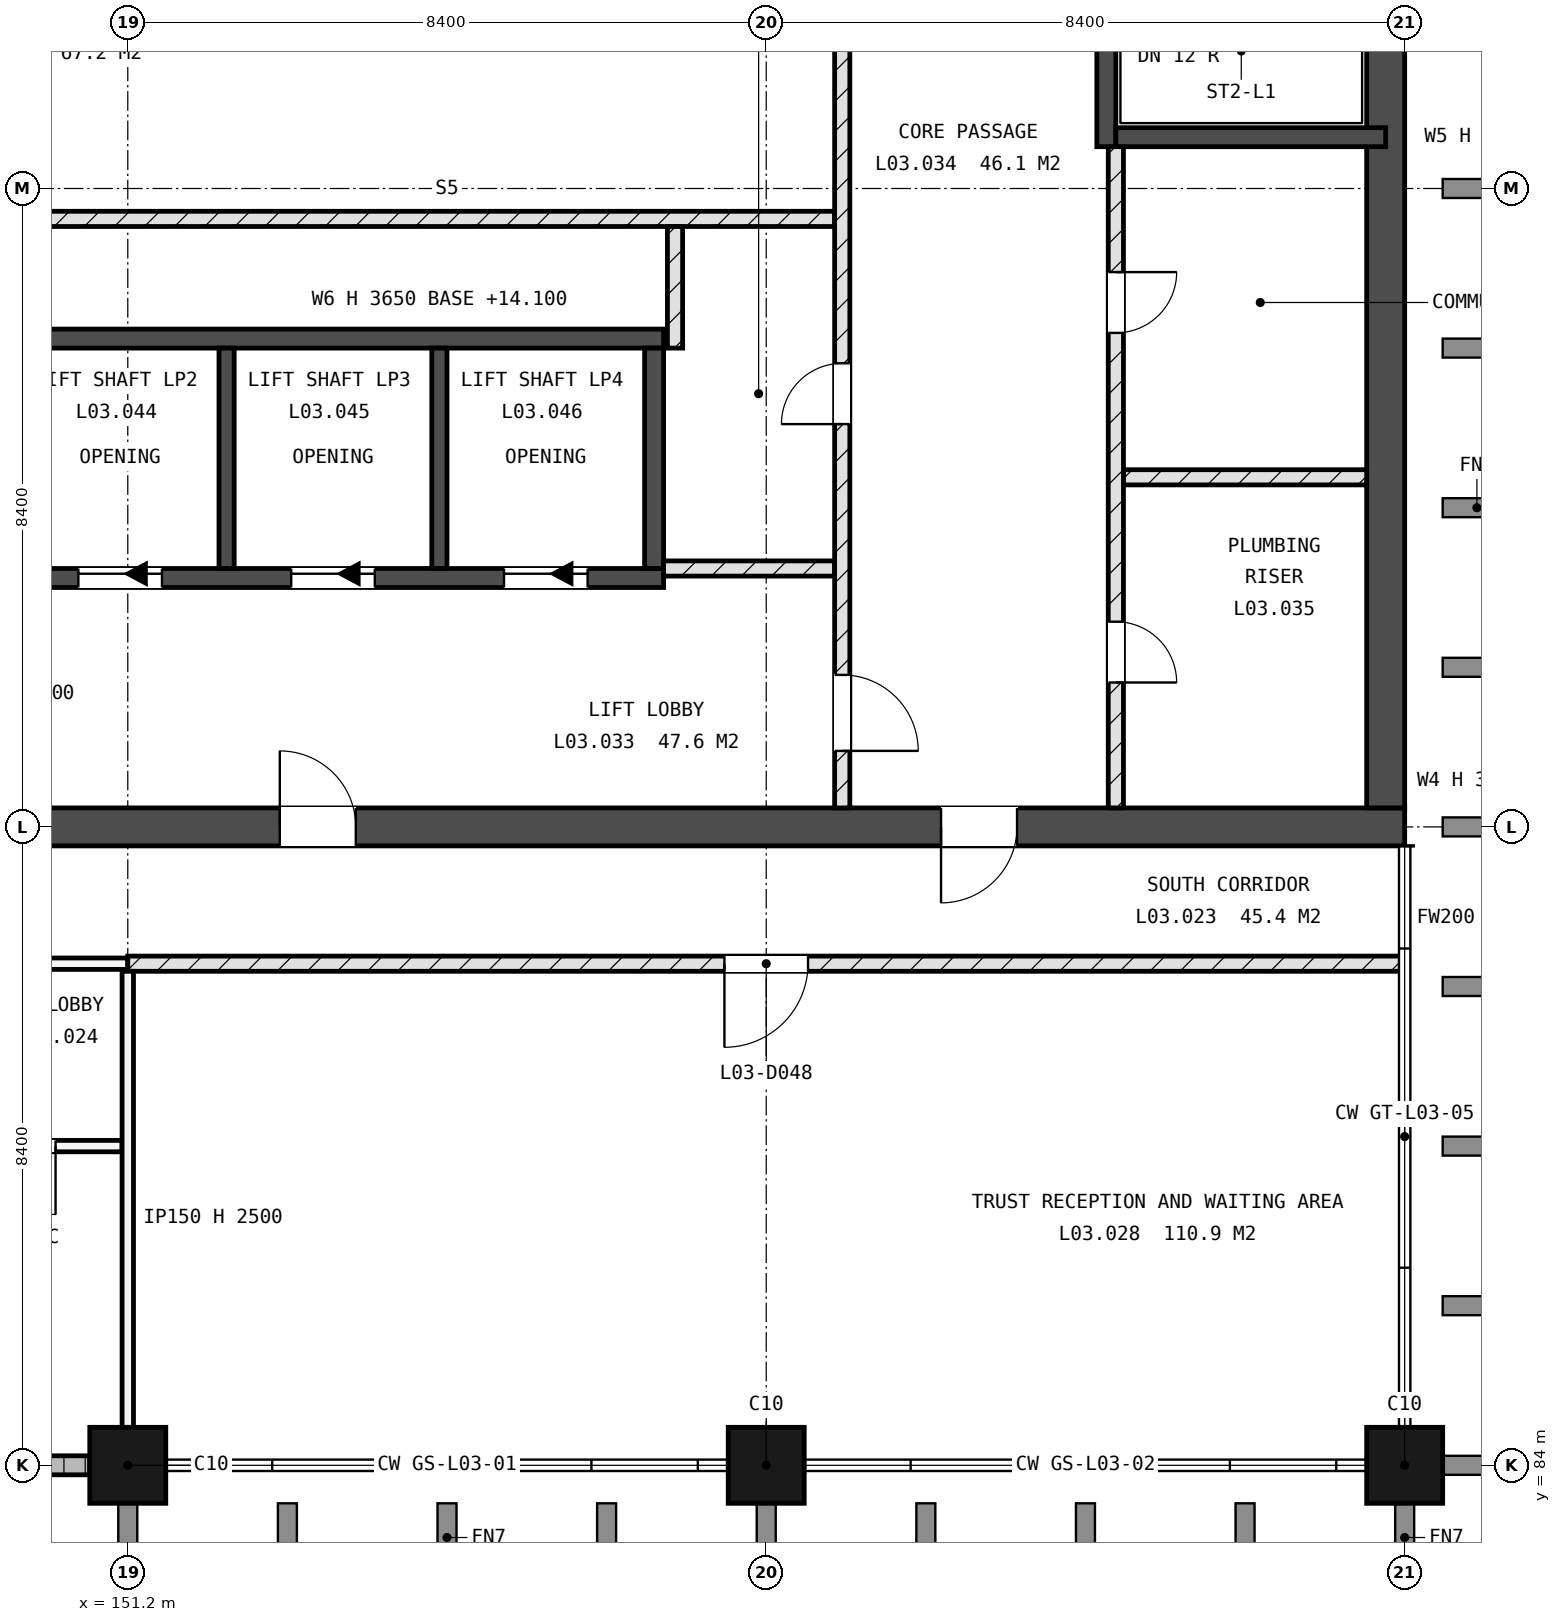
"""IFC4 building model, lengths in metres.
Left out: names, types, materials, properties, quantities, classifications, styles, units other than length and angle.
Written with IfcOpenShell. Run it as: python <this file> out.ifc"""

import sys

from ifc_helpers import new_model, si_unit, direction, frame, frame_2d, origin, origin_2d, place, context, subcontext, project, spatial, rectangle, extrude, element, fill, save


model = new_model("IFC4")
c1 = context("Model", 3, precision=1e-05, world=origin(), true_north=direction((0.0, 1.0)))
c2 = subcontext(c1, "Body", "Model", "MODEL_VIEW")
j1 = project(units=[si_unit("LENGTHUNIT", "METRE"), si_unit("PLANEANGLEUNIT", "RADIAN")], contexts=[c1])
p1 = place(None, origin())
s1 = spatial("IfcSite", under=j1, at=p1, CompositionType="ELEMENT")
p2 = place(p1, origin())
s2 = spatial("IfcBuilding", under=s1, at=p2, CompositionType="ELEMENT")
p3 = place(p2, frame((0.0, 0.0, 14.4)))
s3 = spatial("IfcBuildingStorey", under=s2, at=p3, CompositionType="ELEMENT", Elevation=14.4)
for number, where, z_axis, x_axis in (
    (1, (151.2, 84.0, -0.3), (0.0, 0.0, 1.0), (1.0, 0.0, 0.0)),
    (2, (159.6, 84.0, -0.3), (0.0, 0.0, 1.0), (1.0, 0.0, 0.0)),
    (3, (168.0, 84.0, -0.3), (0.0, 0.0, 1.0), (1.0, 0.0, 0.0)),
):
    element("IfcColumn", number, at=place(p3, frame(where, z_axis=z_axis, x_axis=x_axis)), inside=s3, PredefinedType="COLUMN", context=c2, shape_type="SweptSolid", body=[
        extrude(rectangle(XDim=1.0, YDim=1.0, at=origin_2d()), origin(), (0.0, 0.0, 1.0), 3.65),
    ])
p4 = place(p3, frame((142.8, 92.4, -0.3), z_axis=(0.0, 0.0, 1.0), x_axis=(1.0, 0.0, 0.0)))
e4 = element("IfcWall", 4, at=p4, inside=s3, PredefinedType="SHEAR", context=c2, shape_type="SweptSolid", body=[
    extrude(rectangle(XDim=25.2, YDim=0.5, at=frame_2d((12.6, 0.0))), origin(), (0.0, 0.0, 1.0), 3.65),
])
p5 = place(p4, frame((1.4, 0.0, 0.3)))
e5 = element("IfcOpeningElement", 5, at=p5, cuts=e4, PredefinedType="OPENING", context=c2, shape_type="SweptSolid", body=[
    extrude(rectangle(XDim=1.0, YDim=2.1, at=frame_2d((0.5, 1.05))), frame((0.0, 0.26, 0.0), z_axis=(0.0, -1.0, 0.0), x_axis=(1.0, 0.0, 0.0)), (0.0, 0.0, 1.0), 0.52),
])
p6 = place(p4, frame((19.1, 0.0, 0.3)))
e6 = element("IfcOpeningElement", 6, at=p6, cuts=e4, PredefinedType="OPENING", context=c2, shape_type="SweptSolid", body=[
    extrude(rectangle(XDim=1.0, YDim=2.1, at=frame_2d((0.5, 1.05))), frame((0.0, 0.26, 0.0), z_axis=(0.0, -1.0, 0.0), x_axis=(1.0, 0.0, 0.0)), (0.0, 0.0, 1.0), 0.52),
])
p7 = place(p4, frame((10.4, 0.0, 0.3)))
e7 = element("IfcOpeningElement", 7, at=p7, cuts=e4, PredefinedType="OPENING", context=c2, shape_type="SweptSolid", body=[
    extrude(rectangle(XDim=1.0, YDim=2.1, at=frame_2d((0.5, 1.05))), frame((0.0, 0.26, 0.0), z_axis=(0.0, -1.0, 0.0), x_axis=(1.0, 0.0, 0.0)), (0.0, 0.0, 1.0), 0.52),
])
p8 = place(p3, frame((167.75, 92.65, -0.3), z_axis=(0.0, 0.0, 1.0), x_axis=(0.0, 1.0, 0.0)))
e8 = element("IfcWall", 8, at=p8, inside=s3, PredefinedType="SHEAR", context=c2, shape_type="SweptSolid", body=[
    extrude(rectangle(XDim=16.3, YDim=0.5, at=frame_2d((8.15, 0.0))), origin(), (0.0, 0.0, 1.0), 3.65),
])
p9 = place(p8, frame((12.15, 0.0, 1.9)))
e9 = element("IfcOpeningElement", 9, at=p9, cuts=e8, PredefinedType="OPENING", context=c2, shape_type="SweptSolid", body=[
    extrude(rectangle(XDim=1.2, YDim=0.9, at=frame_2d((0.6, 0.45))), frame((0.0, 0.26, 0.0), z_axis=(0.0, -1.0, 0.0), x_axis=(1.0, 0.0, 0.0)), (0.0, 0.0, 1.0), 0.52),
])
p10 = place(p3, frame((164.075, 101.35, -0.3), z_axis=(0.0, 0.0, 1.0), x_axis=(0.0, 1.0, 0.0)))
e10 = element("IfcWall", 10, at=p10, inside=s3, PredefinedType="SHEAR", context=c2, shape_type="SweptSolid", body=[
    extrude(rectangle(XDim=7.6, YDim=0.25, at=frame_2d((3.8, 0.0))), origin(), (0.0, 0.0, 1.0), 3.65),
])
p11 = place(p10, frame((6.5, 0.0, 0.3)))
e11 = element("IfcOpeningElement", 11, at=p11, cuts=e10, PredefinedType="OPENING", context=c2, shape_type="SweptSolid", body=[
    extrude(rectangle(XDim=1.0, YDim=2.1, at=frame_2d((0.5, 1.05))), frame((0.0, 0.135, 0.0), z_axis=(0.0, -1.0, 0.0), x_axis=(1.0, 0.0, 0.0)), (0.0, 0.0, 1.0), 0.27),
])
p12 = place(p3, frame((164.2, 101.475, -0.3), z_axis=(0.0, 0.0, 1.0), x_axis=(1.0, 0.0, 0.0)))
e12 = element("IfcWall", 12, at=p12, inside=s3, PredefinedType="SHEAR", context=c2, shape_type="SweptSolid", body=[
    extrude(rectangle(XDim=3.55, YDim=0.25, at=frame_2d((1.775, 0.0))), origin(), (0.0, 0.0, 1.0), 3.65),
])
p13 = place(p3, frame((147.0, 95.675, -0.3), z_axis=(0.0, 0.0, 1.0), x_axis=(1.0, 0.0, 0.0)))
e13 = element("IfcWall", 13, at=p13, inside=s3, PredefinedType="SHEAR", context=c2, shape_type="SweptSolid", body=[
    extrude(rectangle(XDim=11.25, YDim=0.25, at=frame_2d((5.625, 0.0))), origin(), (0.0, 0.0, 1.0), 3.65),
])
p14 = place(p13, frame((0.75, 0.0, 0.3)))
e14 = element("IfcOpeningElement", 14, at=p14, cuts=e13, PredefinedType="OPENING", context=c2, shape_type="SweptSolid", body=[
    extrude(rectangle(XDim=1.1, YDim=2.1, at=frame_2d((0.55, 1.05))), frame((0.0, 0.135, 0.0), z_axis=(0.0, -1.0, 0.0), x_axis=(1.0, 0.0, 0.0)), (0.0, 0.0, 1.0), 0.27),
])
p15 = place(p13, frame((3.55, 0.0, 0.3)))
e15 = element("IfcOpeningElement", 15, at=p15, cuts=e13, PredefinedType="OPENING", context=c2, shape_type="SweptSolid", body=[
    extrude(rectangle(XDim=1.1, YDim=2.1, at=frame_2d((0.55, 1.05))), frame((0.0, 0.135, 0.0), z_axis=(0.0, -1.0, 0.0), x_axis=(1.0, 0.0, 0.0)), (0.0, 0.0, 1.0), 0.27),
])
p16 = place(p13, frame((6.35, 0.0, 0.3)))
e16 = element("IfcOpeningElement", 16, at=p16, cuts=e13, PredefinedType="OPENING", context=c2, shape_type="SweptSolid", body=[
    extrude(rectangle(XDim=1.1, YDim=2.1, at=frame_2d((0.55, 1.05))), frame((0.0, 0.135, 0.0), z_axis=(0.0, -1.0, 0.0), x_axis=(1.0, 0.0, 0.0)), (0.0, 0.0, 1.0), 0.27),
])
p17 = place(p13, frame((9.15, 0.0, 0.3)))
e17 = element("IfcOpeningElement", 17, at=p17, cuts=e13, PredefinedType="OPENING", context=c2, shape_type="SweptSolid", body=[
    extrude(rectangle(XDim=1.1, YDim=2.1, at=frame_2d((0.55, 1.05))), frame((0.0, 0.135, 0.0), z_axis=(0.0, -1.0, 0.0), x_axis=(1.0, 0.0, 0.0)), (0.0, 0.0, 1.0), 0.27),
])
p18 = place(p3, frame((147.0, 98.825, -0.3), z_axis=(0.0, 0.0, 1.0), x_axis=(1.0, 0.0, 0.0)))
e18 = element("IfcWall", 18, at=p18, inside=s3, PredefinedType="SHEAR", context=c2, shape_type="SweptSolid", body=[
    extrude(rectangle(XDim=11.25, YDim=0.25, at=frame_2d((5.625, 0.0))), origin(), (0.0, 0.0, 1.0), 3.65),
])
p19 = place(p3, frame((158.125, 95.8, -0.3), z_axis=(0.0, 0.0, 1.0), x_axis=(0.0, 1.0, 0.0)))
e19 = element("IfcWall", 19, at=p19, inside=s3, PredefinedType="SHEAR", context=c2, shape_type="SweptSolid", body=[
    extrude(rectangle(XDim=2.9, YDim=0.25, at=frame_2d((1.45, 0.0))), origin(), (0.0, 0.0, 1.0), 3.65),
])
for number, where, z_axis, x_axis in (
    (20, (152.5, 95.8, -0.3), (0.0, 0.0, 1.0), (0.0, 1.0, 0.0)),
    (21, (155.3, 95.8, -0.3), (0.0, 0.0, 1.0), (0.0, 1.0, 0.0)),
):
    element("IfcWall", number, at=place(p3, frame(where, z_axis=z_axis, x_axis=x_axis)), inside=s3, PredefinedType="SHEAR", context=c2, shape_type="SweptSolid", body=[
        extrude(rectangle(XDim=2.9, YDim=0.2, at=frame_2d((1.45, 0.0))), origin(), (0.0, 0.0, 1.0), 3.65),
    ])
p20 = place(p3, frame((143.3, 84.0, 0.0), z_axis=(0.0, 0.0, 1.0), x_axis=(1.0, 0.0, 0.0)))
e22 = element("IfcWall", 22, at=p20, inside=s3, PredefinedType="STANDARD", context=c2, shape_type="SweptSolid", body=[
    extrude(rectangle(XDim=7.4, YDim=0.25, at=frame_2d((3.7, 0.0))), origin(), (0.0, 0.0, 1.0), 2.65),
])
p21 = place(p3, frame((142.925, 88.2, 0.0), z_axis=(0.0, 0.0, 1.0), x_axis=(1.0, 0.0, 0.0)))
e23 = element("IfcWall", 23, at=p21, inside=s3, PredefinedType="PARTITIONING", context=c2, shape_type="SweptSolid", body=[
    extrude(rectangle(XDim=8.2, YDim=0.15, at=frame_2d((4.1, 0.0))), origin(), (0.0, 0.0, 1.0), 3.3),
])
p22 = place(p21, frame((0.825, 0.0, 0.0)))
e24 = element("IfcOpeningElement", 24, at=p22, cuts=e23, PredefinedType="OPENING", context=c2, shape_type="SweptSolid", body=[
    extrude(rectangle(XDim=0.9, YDim=2.1, at=frame_2d((0.45, 1.05))), frame((0.0, 0.085, 0.0), z_axis=(0.0, -1.0, 0.0), x_axis=(1.0, 0.0, 0.0)), (0.0, 0.0, 1.0), 0.17),
])
p23 = place(p21, frame((3.55, 0.0, 0.0)))
e25 = element("IfcOpeningElement", 25, at=p23, cuts=e23, PredefinedType="OPENING", context=c2, shape_type="SweptSolid", body=[
    extrude(rectangle(XDim=1.05, YDim=2.25, at=frame_2d((0.525, 1.125))), frame((0.0, 0.085, 0.0), z_axis=(0.0, -1.0, 0.0), x_axis=(1.0, 0.0, 0.0)), (0.0, 0.0, 1.0), 0.17),
])
p24 = place(p21, frame((6.425, 0.0, 0.0)))
e26 = element("IfcOpeningElement", 26, at=p24, cuts=e23, PredefinedType="OPENING", context=c2, shape_type="SweptSolid", body=[
    extrude(rectangle(XDim=0.9, YDim=2.1, at=frame_2d((0.45, 1.05))), frame((0.0, 0.085, 0.0), z_axis=(0.0, -1.0, 0.0), x_axis=(1.0, 0.0, 0.0)), (0.0, 0.0, 1.0), 0.17),
])
p25 = place(p3, frame((142.925, 90.6, 0.0), z_axis=(0.0, 0.0, 1.0), x_axis=(1.0, 0.0, 0.0)))
e27 = element("IfcWall", 27, at=p25, inside=s3, PredefinedType="PARTITIONING", context=c2, shape_type="SweptSolid", body=[
    extrude(rectangle(XDim=8.275, YDim=0.15, at=frame_2d((4.137, 0.0))), origin(), (0.0, 0.0, 1.0), 3.3),
])
p26 = place(p25, frame((3.575, 0.0, 0.0)))
e28 = element("IfcOpeningElement", 28, at=p26, cuts=e27, PredefinedType="OPENING", context=c2, shape_type="SweptSolid", body=[
    extrude(rectangle(XDim=1.0, YDim=2.1, at=frame_2d((0.5, 1.05))), frame((0.0, 0.085, 0.0), z_axis=(0.0, -1.0, 0.0), x_axis=(1.0, 0.0, 0.0)), (0.0, 0.0, 1.0), 0.17),
])
p27 = place(p3, frame((151.2, 90.6, 0.0), z_axis=(0.0, 0.0, 1.0), x_axis=(1.0, 0.0, 0.0)))
e29 = element("IfcWall", 29, at=p27, inside=s3, PredefinedType="SOLIDWALL", context=c2, shape_type="SweptSolid", body=[
    extrude(rectangle(XDim=16.8, YDim=0.2, at=frame_2d((8.4, 0.0))), origin(), (0.0, 0.0, 1.0), 3.3),
])
p28 = place(p27, frame((7.85, 0.0, 0.0)))
e30 = element("IfcOpeningElement", 30, at=p28, cuts=e29, PredefinedType="OPENING", context=c2, shape_type="SweptSolid", body=[
    extrude(rectangle(XDim=1.1, YDim=2.25, at=frame_2d((0.55, 1.125))), frame((0.0, 0.11, 0.0), z_axis=(0.0, -1.0, 0.0), x_axis=(1.0, 0.0, 0.0)), (0.0, 0.0, 1.0), 0.22),
])
p29 = place(p3, frame((158.25, 95.8, 0.0), z_axis=(0.0, 0.0, 1.0), x_axis=(1.0, 0.0, 0.0)))
e31 = element("IfcWall", 31, at=p29, inside=s3, PredefinedType="SOLIDWALL", context=c2, shape_type="SweptSolid", body=[
    extrude(rectangle(XDim=2.25, YDim=0.2, at=frame_2d((1.125, 0.0))), origin(), (0.0, 0.0, 1.0), 3.3),
])
p30 = place(p3, frame((164.3, 97.0, 0.0), z_axis=(0.0, 0.0, 1.0), x_axis=(1.0, 0.0, 0.0)))
e32 = element("IfcWall", 32, at=p30, inside=s3, PredefinedType="SOLIDWALL", context=c2, shape_type="SweptSolid", body=[
    extrude(rectangle(XDim=3.2, YDim=0.2, at=frame_2d((1.6, 0.0))), origin(), (0.0, 0.0, 1.0), 3.3),
])
p31 = place(p3, frame((146.5, 100.4, 0.0), z_axis=(0.0, 0.0, 1.0), x_axis=(1.0, 0.0, 0.0)))
e33 = element("IfcWall", 33, at=p31, inside=s3, PredefinedType="SOLIDWALL", context=c2, shape_type="SweptSolid", body=[
    extrude(rectangle(XDim=14.0, YDim=0.2, at=frame_2d((7.0, 0.0))), origin(), (0.0, 0.0, 1.0), 3.3),
])
p32 = place(p3, frame((151.2, 84.0, 0.0), z_axis=(0.0, 0.0, 1.0), x_axis=(0.0, 1.0, 0.0)))
e34 = element("IfcWall", 34, at=p32, inside=s3, PredefinedType="PARTITIONING", context=c2, shape_type="SweptSolid", body=[
    extrude(rectangle(XDim=6.5, YDim=0.15, at=frame_2d((3.25, 0.0))), origin(), (0.0, 0.0, 1.0), 2.5),
])
p33 = place(p3, frame((158.4, 98.7, 0.0), z_axis=(0.0, 0.0, 1.0), x_axis=(0.0, 1.0, 0.0)))
e35 = element("IfcWall", 35, at=p33, inside=s3, PredefinedType="SOLIDWALL", context=c2, shape_type="SweptSolid", body=[
    extrude(rectangle(XDim=1.6, YDim=0.2, at=frame_2d((0.8, 0.0))), origin(), (0.0, 0.0, 1.0), 3.3),
])
p34 = place(p3, frame((160.6, 92.65, 0.0), z_axis=(0.0, 0.0, 1.0), x_axis=(0.0, 1.0, 0.0)))
e36 = element("IfcWall", 36, at=p34, inside=s3, PredefinedType="SOLIDWALL", context=c2, shape_type="SweptSolid", body=[
    extrude(rectangle(XDim=12.45, YDim=0.2, at=frame_2d((6.225, 0.0))), origin(), (0.0, 0.0, 1.0), 3.3),
])
p35 = place(p34, frame((5.05, 0.0, 0.0)))
e37 = element("IfcOpeningElement", 37, at=p35, cuts=e36, PredefinedType="OPENING", context=c2, shape_type="SweptSolid", body=[
    extrude(rectangle(XDim=0.8, YDim=2.1, at=frame_2d((0.4, 1.05))), frame((0.0, 0.11, 0.0), z_axis=(0.0, -1.0, 0.0), x_axis=(1.0, 0.0, 0.0)), (0.0, 0.0, 1.0), 0.22),
])
p36 = place(p34, frame((0.75, 0.0, 0.0)))
e38 = element("IfcOpeningElement", 38, at=p36, cuts=e36, PredefinedType="OPENING", context=c2, shape_type="SweptSolid", body=[
    extrude(rectangle(XDim=1.0, YDim=2.1, at=frame_2d((0.5, 1.05))), frame((0.0, 0.11, 0.0), z_axis=(0.0, -1.0, 0.0), x_axis=(1.0, 0.0, 0.0)), (0.0, 0.0, 1.0), 0.22),
])
p37 = place(p3, frame((164.2, 92.65, 0.0), z_axis=(0.0, 0.0, 1.0), x_axis=(0.0, 1.0, 0.0)))
e39 = element("IfcWall", 39, at=p37, inside=s3, PredefinedType="SOLIDWALL", context=c2, shape_type="SweptSolid", body=[
    extrude(rectangle(XDim=8.7, YDim=0.2, at=frame_2d((4.35, 0.0))), origin(), (0.0, 0.0, 1.0), 3.3),
])
p38 = place(p37, frame((1.65, 0.0, 0.0)))
e40 = element("IfcOpeningElement", 40, at=p38, cuts=e39, PredefinedType="OPENING", context=c2, shape_type="SweptSolid", body=[
    extrude(rectangle(XDim=0.8, YDim=2.1, at=frame_2d((0.4, 1.05))), frame((0.0, 0.11, 0.0), z_axis=(0.0, -1.0, 0.0), x_axis=(1.0, 0.0, 0.0)), (0.0, 0.0, 1.0), 0.22),
])
p39 = place(p37, frame((6.25, 0.0, 0.0)))
e41 = element("IfcOpeningElement", 41, at=p39, cuts=e39, PredefinedType="OPENING", context=c2, shape_type="SweptSolid", body=[
    extrude(rectangle(XDim=0.8, YDim=2.1, at=frame_2d((0.4, 1.05))), frame((0.0, 0.11, 0.0), z_axis=(0.0, -1.0, 0.0), x_axis=(1.0, 0.0, 0.0)), (0.0, 0.0, 1.0), 0.22),
])
p40 = place(p15, origin())
e42 = element("IfcDoor", 42, at=p40, inside=s3, OperationType="SLIDING_TO_LEFT", PredefinedType="DOOR", context=c2, shape_type="SweptSolid", body=[
    extrude(rectangle(XDim=1.1, YDim=2.1, at=frame_2d((0.55, 1.05))), frame((0.0, 0.025, 0.0), z_axis=(0.0, -1.0, 0.0), x_axis=(1.0, 0.0, 0.0)), (0.0, 0.0, 1.0), 0.05),
])
fill(e15, e42)
p41 = place(p16, origin())
e43 = element("IfcDoor", 43, at=p41, inside=s3, OperationType="SLIDING_TO_LEFT", PredefinedType="DOOR", context=c2, shape_type="SweptSolid", body=[
    extrude(rectangle(XDim=1.1, YDim=2.1, at=frame_2d((0.55, 1.05))), frame((0.0, 0.025, 0.0), z_axis=(0.0, -1.0, 0.0), x_axis=(1.0, 0.0, 0.0)), (0.0, 0.0, 1.0), 0.05),
])
fill(e16, e43)
p42 = place(p17, origin())
e44 = element("IfcDoor", 44, at=p42, inside=s3, OperationType="SLIDING_TO_LEFT", PredefinedType="DOOR", context=c2, shape_type="SweptSolid", body=[
    extrude(rectangle(XDim=1.1, YDim=2.1, at=frame_2d((0.55, 1.05))), frame((0.0, 0.025, 0.0), z_axis=(0.0, -1.0, 0.0), x_axis=(1.0, 0.0, 0.0)), (0.0, 0.0, 1.0), 0.05),
])
fill(e17, e44)
p43 = place(p24, origin())
e45 = element("IfcDoor", 45, at=p43, inside=s3, OperationType="SINGLE_SWING_RIGHT", PredefinedType="DOOR", context=c2, shape_type="SweptSolid", body=[
    extrude(rectangle(XDim=0.9, YDim=2.1, at=frame_2d((0.45, 1.05))), frame((0.0, 0.025, 0.0), z_axis=(0.0, -1.0, 0.0), x_axis=(1.0, 0.0, 0.0)), (0.0, 0.0, 1.0), 0.05),
])
fill(e26, e45)
p44 = place(p28, origin())
e46 = element("IfcDoor", 46, at=p44, inside=s3, OperationType="SINGLE_SWING_LEFT", PredefinedType="DOOR", context=c2, shape_type="SweptSolid", body=[
    extrude(rectangle(XDim=1.1, YDim=2.25, at=frame_2d((0.55, 1.125))), frame((0.0, 0.025, 0.0), z_axis=(0.0, -1.0, 0.0), x_axis=(1.0, 0.0, 0.0)), (0.0, 0.0, 1.0), 0.05),
])
fill(e30, e46)
p45 = place(p38, origin())
e47 = element("IfcDoor", 47, at=p45, inside=s3, OperationType="SINGLE_SWING_LEFT", PredefinedType="DOOR", context=c2, shape_type="SweptSolid", body=[
    extrude(rectangle(XDim=0.8, YDim=2.1, at=frame_2d((0.4, 1.05))), frame((0.0, 0.025, 0.0), z_axis=(0.0, -1.0, 0.0), x_axis=(1.0, 0.0, 0.0)), (0.0, 0.0, 1.0), 0.05),
])
fill(e40, e47)
p46 = place(p39, origin())
e48 = element("IfcDoor", 48, at=p46, inside=s3, OperationType="SINGLE_SWING_RIGHT", PredefinedType="DOOR", context=c2, shape_type="SweptSolid", body=[
    extrude(rectangle(XDim=0.8, YDim=2.1, at=frame_2d((0.4, 1.05))), frame((0.0, 0.025, 0.0), z_axis=(0.0, -1.0, 0.0), x_axis=(1.0, 0.0, 0.0)), (0.0, 0.0, 1.0), 0.05),
])
fill(e41, e48)
p47 = place(p35, origin())
e49 = element("IfcDoor", 49, at=p47, inside=s3, OperationType="SINGLE_SWING_RIGHT", PredefinedType="DOOR", context=c2, shape_type="SweptSolid", body=[
    extrude(rectangle(XDim=0.8, YDim=2.1, at=frame_2d((0.4, 1.05))), frame((0.0, 0.025, 0.0), z_axis=(0.0, -1.0, 0.0), x_axis=(1.0, 0.0, 0.0)), (0.0, 0.0, 1.0), 0.05),
])
fill(e37, e49)
p48 = place(p6, origin())
e50 = element("IfcDoor", 50, at=p48, inside=s3, OperationType="SINGLE_SWING_LEFT", PredefinedType="DOOR", context=c2, shape_type="SweptSolid", body=[
    extrude(rectangle(XDim=1.0, YDim=2.1, at=frame_2d((0.5, 1.05))), frame((0.0, 0.025, 0.0), z_axis=(0.0, -1.0, 0.0), x_axis=(1.0, 0.0, 0.0)), (0.0, 0.0, 1.0), 0.05),
])
fill(e6, e50)
p49 = place(p7, origin())
e51 = element("IfcDoor", 51, at=p49, inside=s3, OperationType="SINGLE_SWING_RIGHT", PredefinedType="DOOR", context=c2, shape_type="SweptSolid", body=[
    extrude(rectangle(XDim=1.0, YDim=2.1, at=frame_2d((0.5, 1.05))), frame((0.0, 0.025, 0.0), z_axis=(0.0, -1.0, 0.0), x_axis=(1.0, 0.0, 0.0)), (0.0, 0.0, 1.0), 0.05),
])
fill(e7, e51)
p50 = place(p36, origin())
e52 = element("IfcDoor", 52, at=p50, inside=s3, OperationType="SINGLE_SWING_LEFT", PredefinedType="DOOR", context=c2, shape_type="SweptSolid", body=[
    extrude(rectangle(XDim=1.0, YDim=2.1, at=frame_2d((0.5, 1.05))), frame((0.0, 0.025, 0.0), z_axis=(0.0, -1.0, 0.0), x_axis=(1.0, 0.0, 0.0)), (0.0, 0.0, 1.0), 0.05),
])
fill(e38, e52)
save(model, sys.argv[1])
